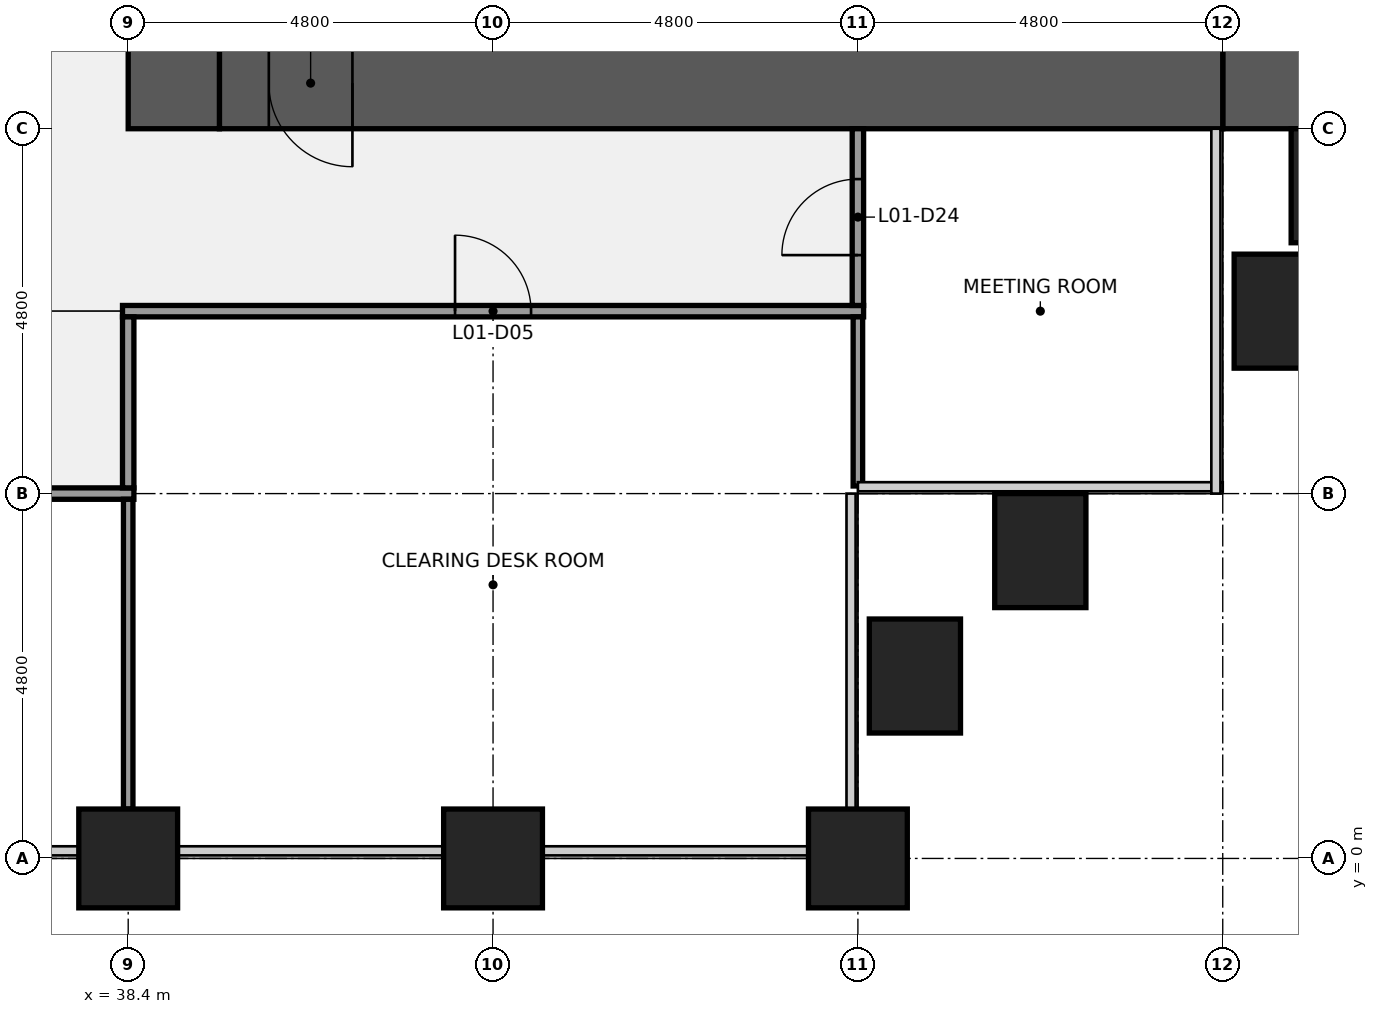
"""IFC4 building model, lengths in metres.
Left out: names, types, materials, properties, quantities, classifications, styles, units other than length and angle.
Written with IfcOpenShell. Run it as: python <this file> out.ifc"""

import sys

from ifc_helpers import new_model, si_unit, direction, frame, frame_2d, origin, origin_2d, place, context, subcontext, project, spatial, rectangle, extrude, element, fill, save


model = new_model("IFC4")
c1 = context("Model", 3, precision=1e-05, world=origin(), true_north=direction((0.0, 1.0)))
c2 = subcontext(c1, "Body", "Model", "MODEL_VIEW")
j1 = project(units=[si_unit("LENGTHUNIT", "METRE"), si_unit("PLANEANGLEUNIT", "RADIAN")], contexts=[c1])
p1 = place(None, origin())
s1 = spatial("IfcSite", under=j1, at=p1, CompositionType="ELEMENT")
p2 = place(p1, origin())
s2 = spatial("IfcBuilding", under=s1, at=p2, CompositionType="ELEMENT")
p3 = place(p2, frame((0.0, 0.0, 12.6)))
s3 = spatial("IfcBuildingStorey", under=s2, at=p3, CompositionType="ELEMENT", Elevation=12.6)
for number, where, z_axis, x_axis in (
    (1, (38.4, 0.0, 0.0), (0.0, 0.0, 1.0), (1.0, 0.0, 0.0)),
    (2, (43.2, 0.0, 0.0), (0.0, 0.0, 1.0), (1.0, 0.0, 0.0)),
    (3, (48.0, 0.0, 0.0), (0.0, 0.0, 1.0), (1.0, 0.0, 0.0)),
):
    element("IfcColumn", number, at=place(p3, frame(where, z_axis=z_axis, x_axis=x_axis)), inside=s3, PredefinedType="COLUMN", context=c2, shape_type="SweptSolid", body=[
        extrude(rectangle(XDim=1.3, YDim=1.3, at=origin_2d()), origin(), (0.0, 0.0, 1.0), 4.4),
    ])
p4 = place(p3, frame((56.4, 10.2, 0.0), z_axis=(0.0, 0.0, 1.0), x_axis=(-1.0, 0.0, 0.0)))
e4 = element("IfcWall", 4, at=p4, inside=s3, PredefinedType="SHEAR", context=c2, shape_type="SweptSolid", body=[
    extrude(rectangle(XDim=3.6, YDim=1.2, at=frame_2d((1.8, 0.0))), origin(), (0.0, 0.0, 1.0), 4.24),
])
p5 = place(p3, frame((52.8, 10.2, 0.0), z_axis=(0.0, 0.0, 1.0), x_axis=(-1.0, 0.0, 0.0)))
e5 = element("IfcWall", 5, at=p5, inside=s3, PredefinedType="SHEAR", context=c2, shape_type="SweptSolid", body=[
    extrude(rectangle(XDim=13.2, YDim=1.2, at=frame_2d((6.6, 0.0))), origin(), (0.0, 0.0, 1.0), 4.24),
])
p6 = place(p5, frame((11.45, 0.0, 0.0)))
e6 = element("IfcOpeningElement", 6, at=p6, cuts=e5, PredefinedType="OPENING", context=c2, shape_type="SweptSolid", body=[
    extrude(rectangle(XDim=1.1, YDim=2.1, at=frame_2d((0.55, 1.05))), frame((0.0, 0.61, 0.0), z_axis=(0.0, -1.0, 0.0), x_axis=(1.0, 0.0, 0.0)), (0.0, 0.0, 1.0), 1.22),
])
p7 = place(p3, frame((39.0, 9.6, 0.0), z_axis=(0.0, 0.0, 1.0), x_axis=(0.0, 1.0, 0.0)))
e7 = element("IfcWall", 7, at=p7, inside=s3, PredefinedType="SHEAR", context=c2, shape_type="SweptSolid", body=[
    extrude(rectangle(XDim=28.8, YDim=1.2, at=frame_2d((14.4, 0.0))), origin(), (0.0, 0.0, 1.0), 4.24),
])
p8 = place(p7, frame((8.7, 0.0, 0.0)))
e8 = element("IfcOpeningElement", 8, at=p8, cuts=e7, PredefinedType="OPENING", context=c2, shape_type="SweptSolid", body=[
    extrude(rectangle(XDim=1.8, YDim=2.1, at=frame_2d((0.9, 1.05))), frame((0.0, 0.61, 0.0), z_axis=(0.0, -1.0, 0.0), x_axis=(1.0, 0.0, 0.0)), (0.0, 0.0, 1.0), 1.22),
])
p9 = place(p7, frame((18.3, 0.0, 0.0)))
e9 = element("IfcOpeningElement", 9, at=p9, cuts=e7, PredefinedType="OPENING", context=c2, shape_type="SweptSolid", body=[
    extrude(rectangle(XDim=1.8, YDim=2.1, at=frame_2d((0.9, 1.05))), frame((0.0, 0.61, 0.0), z_axis=(0.0, -1.0, 0.0), x_axis=(1.0, 0.0, 0.0)), (0.0, 0.0, 1.0), 1.22),
])
p10 = place(p3, frame((19.125, 4.8, 0.0), z_axis=(0.0, 0.0, 1.0), x_axis=(1.0, 0.0, 0.0)))
e10 = element("IfcWall", 10, at=p10, inside=s3, PredefinedType="PARTITIONING", context=c2, shape_type="SweptSolid", body=[
    extrude(rectangle(XDim=19.35, YDim=0.15, at=frame_2d((9.675, 0.0))), origin(), (0.0, 0.0, 1.0), 3.27),
])
p11 = place(p10, frame((4.375, 0.0, 0.0)))
e11 = element("IfcOpeningElement", 11, at=p11, cuts=e10, PredefinedType="OPENING", context=c2, shape_type="SweptSolid", body=[
    extrude(rectangle(XDim=1.0, YDim=2.1, at=frame_2d((0.5, 1.05))), frame((0.0, 0.085, 0.0), z_axis=(0.0, -1.0, 0.0), x_axis=(1.0, 0.0, 0.0)), (0.0, 0.0, 1.0), 0.17),
])
p12 = place(p10, frame((11.575, 0.0, 0.0)))
e12 = element("IfcOpeningElement", 12, at=p12, cuts=e10, PredefinedType="OPENING", context=c2, shape_type="SweptSolid", body=[
    extrude(rectangle(XDim=1.0, YDim=2.1, at=frame_2d((0.5, 1.05))), frame((0.0, 0.085, 0.0), z_axis=(0.0, -1.0, 0.0), x_axis=(1.0, 0.0, 0.0)), (0.0, 0.0, 1.0), 0.17),
])
p13 = place(p10, frame((16.375, 0.0, 0.0)))
e13 = element("IfcOpeningElement", 13, at=p13, cuts=e10, PredefinedType="OPENING", context=c2, shape_type="SweptSolid", body=[
    extrude(rectangle(XDim=1.0, YDim=2.1, at=frame_2d((0.5, 1.05))), frame((0.0, 0.085, 0.0), z_axis=(0.0, -1.0, 0.0), x_axis=(1.0, 0.0, 0.0)), (0.0, 0.0, 1.0), 0.17),
])
p14 = place(p3, frame((38.325, 7.2, 0.0), z_axis=(0.0, 0.0, 1.0), x_axis=(1.0, 0.0, 0.0)))
e14 = element("IfcWall", 14, at=p14, inside=s3, PredefinedType="PARTITIONING", context=c2, shape_type="SweptSolid", body=[
    extrude(rectangle(XDim=9.75, YDim=0.15, at=frame_2d((4.875, 0.0))), origin(), (0.0, 0.0, 1.0), 3.27),
])
p15 = place(p14, frame((4.375, 0.0, 0.0)))
e15 = element("IfcOpeningElement", 15, at=p15, cuts=e14, PredefinedType="OPENING", context=c2, shape_type="SweptSolid", body=[
    extrude(rectangle(XDim=1.0, YDim=2.1, at=frame_2d((0.5, 1.05))), frame((0.0, 0.085, 0.0), z_axis=(0.0, -1.0, 0.0), x_axis=(1.0, 0.0, 0.0)), (0.0, 0.0, 1.0), 0.17),
])
p16 = place(p3, frame((38.4, 0.65, 0.0), z_axis=(0.0, 0.0, 1.0), x_axis=(0.0, 1.0, 0.0)))
e16 = element("IfcWall", 16, at=p16, inside=s3, PredefinedType="PARTITIONING", context=c2, shape_type="SweptSolid", body=[
    extrude(rectangle(XDim=4.075, YDim=0.125, at=frame_2d((2.038, 0.0))), origin(), (0.0, 0.0, 1.0), 3.27),
])
p17 = place(p3, frame((38.4, 4.875, 0.0), z_axis=(0.0, 0.0, 1.0), x_axis=(0.0, 1.0, 0.0)))
e17 = element("IfcWall", 17, at=p17, inside=s3, PredefinedType="PARTITIONING", context=c2, shape_type="SweptSolid", body=[
    extrude(rectangle(XDim=2.25, YDim=0.15, at=frame_2d((1.125, 0.0))), origin(), (0.0, 0.0, 1.0), 3.27),
])
p18 = place(p3, frame((48.0, 4.9, 0.0), z_axis=(0.0, 0.0, 1.0), x_axis=(0.0, 1.0, 0.0)))
e18 = element("IfcWall", 18, at=p18, inside=s3, PredefinedType="PARTITIONING", context=c2, shape_type="SweptSolid", body=[
    extrude(rectangle(XDim=2.225, YDim=0.125, at=frame_2d((1.113, 0.0))), origin(), (0.0, 0.0, 1.0), 3.27),
])
p19 = place(p3, frame((48.0, 7.275, 0.0), z_axis=(0.0, 0.0, 1.0), x_axis=(0.0, 1.0, 0.0)))
e19 = element("IfcWall", 19, at=p19, inside=s3, PredefinedType="PARTITIONING", context=c2, shape_type="SweptSolid", body=[
    extrude(rectangle(XDim=2.325, YDim=0.15, at=frame_2d((1.163, 0.0))), origin(), (0.0, 0.0, 1.0), 3.27),
])
p20 = place(p19, frame((0.663, 0.0, 0.0)))
e20 = element("IfcOpeningElement", 20, at=p20, cuts=e19, PredefinedType="OPENING", context=c2, shape_type="SweptSolid", body=[
    extrude(rectangle(XDim=1.0, YDim=2.1, at=frame_2d((0.5, 1.05))), frame((0.0, 0.085, 0.0), z_axis=(0.0, -1.0, 0.0), x_axis=(1.0, 0.0, 0.0)), (0.0, 0.0, 1.0), 0.17),
])
for number, where, z_axis, x_axis in (
    (21, (48.75, 2.4, 0.0), (0.0, 0.0, 1.0), (0.0, 1.0, 0.0)),
    (22, (50.4, 4.05, 0.0), (0.0, 0.0, 1.0), (1.0, 0.0, 0.0)),
    (23, (53.55, 7.2, 0.0), (0.0, 0.0, 1.0), (0.0, 1.0, 0.0)),
):
    element("IfcColumn", number, at=place(p3, frame(where, z_axis=z_axis, x_axis=x_axis)), inside=s3, PredefinedType="PILASTER", context=c2, shape_type="SweptSolid", body=[
        extrude(rectangle(XDim=1.2, YDim=1.5, at=origin_2d()), origin(), (0.0, 0.0, 1.0), 4.4),
    ])
p21 = place(p3, frame((55.2, 8.85, 0.0), z_axis=(0.0, 0.0, 1.0), x_axis=(1.0, 0.0, 0.0)))
e24 = element("IfcColumn", 24, at=p21, inside=s3, PredefinedType="PILASTER", context=c2, shape_type="SweptSolid", body=[
    extrude(rectangle(XDim=3.0, YDim=1.5, at=origin_2d()), origin(), (0.0, 0.0, 1.0), 4.4),
])
for number, where, z_axis, x_axis in (
    (25, (38.4, -1.075, 0.0), (0.0, 0.0, 1.0), (1.0, 0.0, 0.0)),
    (26, (43.2, -1.075, 0.0), (0.0, 0.0, 1.0), (1.0, 0.0, 0.0)),
    (27, (48.0, -1.075, 0.0), (0.0, 0.0, 1.0), (1.0, 0.0, 0.0)),
):
    element("IfcColumn", number, at=place(p3, frame(where, z_axis=z_axis, x_axis=x_axis)), inside=s3, PredefinedType="PILASTER", context=c2, shape_type="SweptSolid", body=[
        extrude(rectangle(XDim=4.2, YDim=0.85, at=origin_2d()), origin(), (0.0, 0.0, 1.0), 4.4),
    ])
p22 = place(p6, origin())
e28 = element("IfcDoor", 28, at=p22, inside=s3, OperationType="SINGLE_SWING_LEFT", PredefinedType="DOOR", context=c2, shape_type="SweptSolid", body=[
    extrude(rectangle(XDim=1.1, YDim=2.1, at=frame_2d((0.55, 1.05))), frame((0.0, 0.025, 0.0), z_axis=(0.0, -1.0, 0.0), x_axis=(1.0, 0.0, 0.0)), (0.0, 0.0, 1.0), 0.05),
])
fill(e6, e28)
p23 = place(p15, origin())
e29 = element("IfcDoor", 29, at=p23, inside=s3, OperationType="SINGLE_SWING_LEFT", PredefinedType="DOOR", context=c2, shape_type="SweptSolid", body=[
    extrude(rectangle(XDim=1.0, YDim=2.1, at=frame_2d((0.5, 1.05))), frame((0.0, 0.025, 0.0), z_axis=(0.0, -1.0, 0.0), x_axis=(1.0, 0.0, 0.0)), (0.0, 0.0, 1.0), 0.05),
])
fill(e15, e29)
p24 = place(p20, origin())
e30 = element("IfcDoor", 30, at=p24, inside=s3, OperationType="SINGLE_SWING_LEFT", PredefinedType="DOOR", context=c2, shape_type="SweptSolid", body=[
    extrude(rectangle(XDim=1.0, YDim=2.1, at=frame_2d((0.5, 1.05))), frame((0.0, 0.025, 0.0), z_axis=(0.0, -1.0, 0.0), x_axis=(1.0, 0.0, 0.0)), (0.0, 0.0, 1.0), 0.05),
])
fill(e20, e30)
save(model, sys.argv[1])
